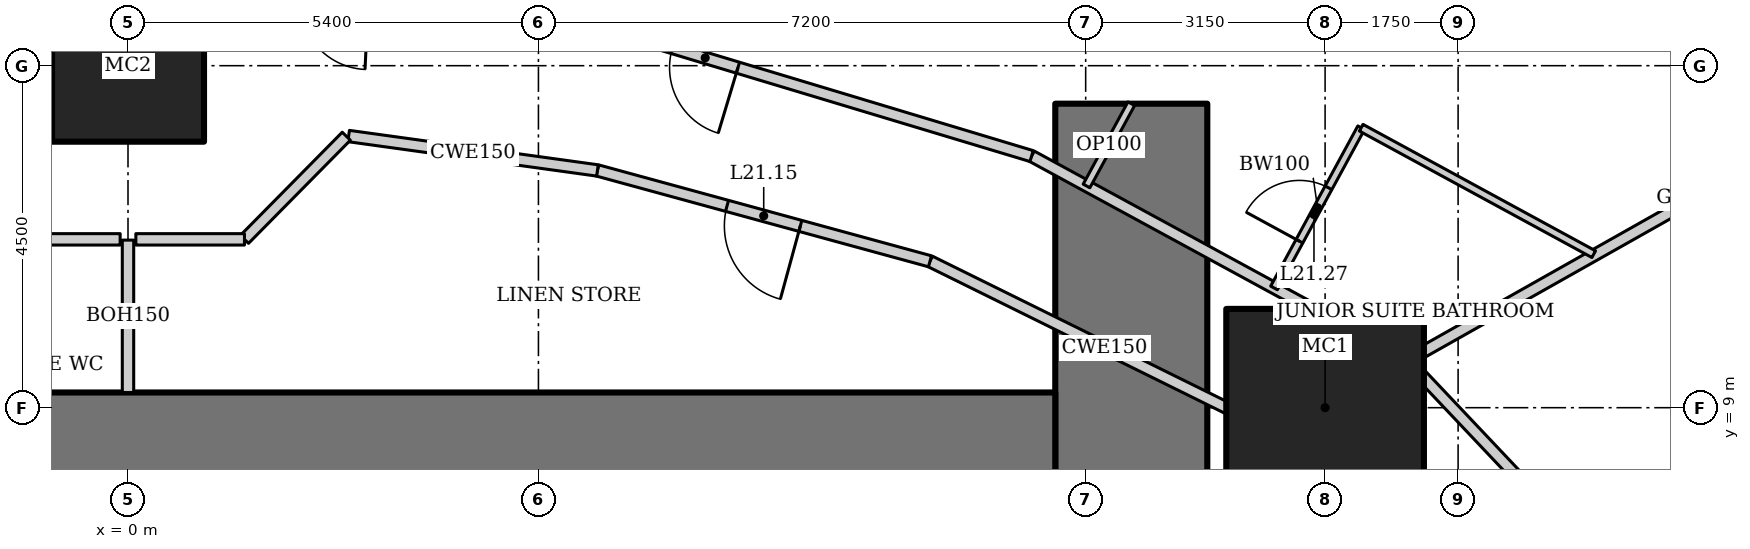
"""IFC4 building model, lengths in metres.
Left out: names, types, materials, properties, quantities, classifications, styles, units other than length and angle.
Written with IfcOpenShell. Run it as: python <this file> out.ifc"""

import sys

from ifc_helpers import new_model, si_unit, direction, frame, frame_2d, origin, origin_2d, place, context, subcontext, project, spatial, rectangle, hollow_rectangle, extrude, element, fill, save


model = new_model("IFC4")
c1 = context("Model", 3, precision=1e-05, world=origin(), true_north=direction((0.0, 1.0)))
c2 = subcontext(c1, "Body", "Model", "MODEL_VIEW")
j1 = project(units=[si_unit("LENGTHUNIT", "METRE"), si_unit("PLANEANGLEUNIT", "RADIAN")], contexts=[c1])
p1 = place(None, origin())
s1 = spatial("IfcSite", under=j1, at=p1, CompositionType="ELEMENT")
p2 = place(p1, origin())
s2 = spatial("IfcBuilding", under=s1, at=p2, CompositionType="ELEMENT")
p3 = place(p2, frame((0.0, 0.0, 91.0)))
s3 = spatial("IfcBuildingStorey", under=s2, at=p3, CompositionType="ELEMENT", Elevation=91.0)
p4 = place(p3, frame((15.75, 9.0, 0.0), z_axis=(0.0, 0.0, 1.0), x_axis=(1.0, 0.0, 0.0)))
e1 = element("IfcColumn", 1, at=p4, inside=s3, PredefinedType="COLUMN", context=c2, shape_type="SweptSolid", body=[
    extrude(hollow_rectangle(XDim=2.6, YDim=2.6, WallThickness=0.13, at=origin_2d()), origin(), (0.0, 0.0, 1.0), 3.6),
])
p5 = place(p3, frame((0.0, 13.5, 0.0), z_axis=(0.0, 0.0, 1.0), x_axis=(1.0, 0.0, 0.0)))
e2 = element("IfcColumn", 2, at=p5, inside=s3, PredefinedType="COLUMN", context=c2, shape_type="SweptSolid", body=[
    extrude(hollow_rectangle(XDim=2.0, YDim=2.0, WallThickness=0.17, at=origin_2d()), origin(), (0.0, 0.0, 1.0), 3.6),
])
p6 = place(p3, frame((13.2, -13.0, 0.0), z_axis=(0.0, 0.0, 1.0), x_axis=(0.0, 1.0, 0.0)))
e3 = element("IfcWall", 3, at=p6, inside=s3, PredefinedType="SHEAR", context=c2, shape_type="SweptSolid", body=[
    extrude(rectangle(XDim=26.0, YDim=2.0, at=frame_2d((13.0, 0.0))), origin(), (0.0, 0.0, 1.0), 3.6),
])
p7 = place(p6, frame((12.1, 0.0, 0.0)))
e4 = element("IfcOpeningElement", 4, at=p7, cuts=e3, PredefinedType="OPENING", context=c2, shape_type="SweptSolid", body=[
    extrude(rectangle(XDim=1.8, YDim=2.1, at=frame_2d((0.9, 1.05))), frame((0.0, 1.01, 0.0), z_axis=(0.0, -1.0, 0.0), x_axis=(1.0, 0.0, 0.0)), (0.0, 0.0, 1.0), 2.02),
])
p8 = place(p3, frame((12.2, 8.0, 0.0), z_axis=(0.0, 0.0, 1.0), x_axis=(-1.0, 0.0, 0.0)))
e5 = element("IfcWall", 5, at=p8, inside=s3, PredefinedType="SHEAR", context=c2, shape_type="SweptSolid", body=[
    extrude(rectangle(XDim=24.4, YDim=2.4, at=frame_2d((12.2, 0.0))), origin(), (0.0, 0.0, 1.0), 3.6),
])
p9 = place(p3, frame((24.435, 13.909, 0.0), z_axis=(0.0, 0.0, 1.0), x_axis=(-0.87090601027, -0.491449612143, 0.0)))
e6 = element("IfcWall", 6, at=p9, inside=s3, PredefinedType="PARTITIONING", context=c2, shape_type="SweptSolid", body=[
    extrude(rectangle(XDim=8.726, YDim=0.15, at=frame_2d((4.363, 0.0))), origin(), (0.0, 0.0, 1.0), 2.693),
])
p10 = place(p3, frame((20.984, 5.232, 0.0), z_axis=(0.0, 0.0, 1.0), x_axis=(-0.687062608696, 0.726598218916, 0.0)))
e7 = element("IfcWall", 7, at=p10, inside=s3, PredefinedType="PARTITIONING", context=c2, shape_type="SweptSolid", body=[
    extrude(rectangle(XDim=6.039, YDim=0.15, at=frame_2d((3.02, 0.0))), origin(), (0.0, 0.0, 1.0), 3.45),
])
p11 = place(p10, frame((0.15, 0.0, 0.0)))
e8 = element("IfcOpeningElement", 8, at=p11, cuts=e7, PredefinedType="OPENING", context=c2, shape_type="SweptSolid", body=[
    extrude(rectangle(XDim=0.9, YDim=2.1, at=frame_2d((0.45, 1.05))), frame((0.0, 0.085, 0.0), z_axis=(0.0, -1.0, 0.0), x_axis=(1.0, 0.0, 0.0)), (0.0, 0.0, 1.0), 0.17),
])
p12 = place(p3, frame((16.835, 9.62, 0.0), z_axis=(0.0, 0.0, 1.0), x_axis=(-0.878450059298, 0.477834169267, 0.0)))
e9 = element("IfcWall", 9, at=p12, inside=s3, PredefinedType="PARTITIONING", context=c2, shape_type="SweptSolid", body=[
    extrude(rectangle(XDim=5.631, YDim=0.15, at=frame_2d((2.815, 0.0))), origin(), (0.0, 0.0, 1.0), 3.45),
])
p13 = place(p3, frame((11.888, 12.311, 0.0), z_axis=(0.0, 0.0, 1.0), x_axis=(-0.957564241242, 0.288219922793, 0.0)))
e10 = element("IfcWall", 10, at=p13, inside=s3, PredefinedType="PARTITIONING", context=c2, shape_type="SweptSolid", body=[
    extrude(rectangle(XDim=5.085, YDim=0.15, at=frame_2d((2.542, 0.0))), origin(), (0.0, 0.0, 1.0), 3.45),
])
p14 = place(p13, frame((4.035, 0.0, 0.0)))
e11 = element("IfcOpeningElement", 11, at=p14, cuts=e10, PredefinedType="OPENING", context=c2, shape_type="SweptSolid", body=[
    extrude(rectangle(XDim=0.9, YDim=2.1, at=frame_2d((0.45, 1.05))), frame((0.0, 0.085, 0.0), z_axis=(0.0, -1.0, 0.0), x_axis=(1.0, 0.0, 0.0)), (0.0, 0.0, 1.0), 0.17),
])
p15 = place(p3, frame((19.177, 4.781, 0.0), z_axis=(0.0, 0.0, 1.0), x_axis=(-0.720837261072, 0.693104352209, 0.0)))
e12 = element("IfcWall", 12, at=p15, inside=s3, PredefinedType="PARTITIONING", context=c2, shape_type="SweptSolid", body=[
    extrude(rectangle(XDim=5.59, YDim=0.15, at=frame_2d((2.795, 0.0))), origin(), (0.0, 0.0, 1.0), 3.45),
])
p16 = place(p15, frame((2.295, 0.0, 0.0)))
e13 = element("IfcOpeningElement", 13, at=p16, cuts=e12, PredefinedType="OPENING", context=c2, shape_type="SweptSolid", body=[
    extrude(rectangle(XDim=1.0, YDim=2.1, at=frame_2d((0.5, 1.05))), frame((0.0, 0.085, 0.0), z_axis=(0.0, -1.0, 0.0), x_axis=(1.0, 0.0, 0.0)), (0.0, 0.0, 1.0), 0.17),
])
p17 = place(p3, frame((15.147, 8.656, 0.0), z_axis=(0.0, 0.0, 1.0), x_axis=(-0.89656943448, 0.442903205177, 0.0)))
e14 = element("IfcWall", 14, at=p17, inside=s3, PredefinedType="PARTITIONING", context=c2, shape_type="SweptSolid", body=[
    extrude(rectangle(XDim=5.126, YDim=0.15, at=frame_2d((2.563, 0.0))), origin(), (0.0, 0.0, 1.0), 3.45),
])
p18 = place(p3, frame((10.551, 10.926, 0.0), z_axis=(0.0, 0.0, 1.0), x_axis=(-0.964644466646, 0.263554648923, 0.0)))
e15 = element("IfcWall", 15, at=p18, inside=s3, PredefinedType="PARTITIONING", context=c2, shape_type="SweptSolid", body=[
    extrude(rectangle(XDim=4.535, YDim=0.15, at=frame_2d((2.268, 0.0))), origin(), (0.0, 0.0, 1.0), 3.45),
])
p19 = place(p18, frame((1.768, 0.0, 0.0)))
e16 = element("IfcOpeningElement", 16, at=p19, cuts=e15, PredefinedType="OPENING", context=c2, shape_type="SweptSolid", body=[
    extrude(rectangle(XDim=1.0, YDim=2.1, at=frame_2d((0.5, 1.05))), frame((0.0, 0.085, 0.0), z_axis=(0.0, -1.0, 0.0), x_axis=(1.0, 0.0, 0.0)), (0.0, 0.0, 1.0), 0.17),
])
p20 = place(p3, frame((6.176, 12.122, 0.0), z_axis=(0.0, 0.0, 1.0), x_axis=(-0.990563451353, 0.137054911782, 0.0)))
e17 = element("IfcWall", 17, at=p20, inside=s3, PredefinedType="PARTITIONING", context=c2, shape_type="SweptSolid", body=[
    extrude(rectangle(XDim=3.304, YDim=0.15, at=frame_2d((1.652, 0.0))), origin(), (0.0, 0.0, 1.0), 3.45),
])
p21 = place(p3, frame((15.078, 10.576, 0.0), z_axis=(0.0, 0.0, 1.0), x_axis=(0.477832549678, 0.878450940274, 0.0)))
e18 = element("IfcWall", 18, at=p21, inside=s3, PredefinedType="PARTITIONING", context=c2, shape_type="SweptSolid", body=[
    extrude(rectangle(XDim=2.4, YDim=0.1, at=frame_2d((1.2, 0.0))), origin(), (0.0, 0.0, 1.0), 3.45),
])
p22 = place(p21, frame((0.7, 0.0, 0.0)))
e19 = element("IfcOpeningElement", 19, at=p22, cuts=e18, PredefinedType="OPENING", context=c2, shape_type="SweptSolid", body=[
    extrude(rectangle(XDim=0.8, YDim=2.1, at=frame_2d((0.4, 1.05))), frame((0.0, 0.06, 0.0), z_axis=(0.0, -1.0, 0.0), x_axis=(1.0, 0.0, 0.0)), (0.0, 0.0, 1.0), 0.12),
])
p23 = place(p3, frame((16.225, 12.684, 0.0), z_axis=(0.0, 0.0, 1.0), x_axis=(0.878473578893, -0.477790928322, 0.0)))
e20 = element("IfcWall", 20, at=p23, inside=s3, PredefinedType="PARTITIONING", context=c2, shape_type="SweptSolid", body=[
    extrude(rectangle(XDim=3.483, YDim=0.1, at=frame_2d((1.741, 0.0))), origin(), (0.0, 0.0, 1.0), 3.45),
])
p24 = place(p3, frame((13.2, 13.0, 0.0), z_axis=(0.0, 0.0, 1.0), x_axis=(-0.477852414256, -0.878440134665, 0.0)))
e21 = element("IfcWall", 21, at=p24, inside=s3, PredefinedType="PARTITIONING", context=c2, shape_type="SweptSolid", body=[
    extrude(rectangle(XDim=1.232, YDim=0.1, at=frame_2d((0.616, 0.0))), origin(), (0.0, 0.0, 1.0), 3.45),
])
p25 = place(p3, frame((0.0, 9.2, 0.0), z_axis=(0.0, 0.0, 1.0), x_axis=(0.0, 1.0, 0.0)))
e22 = element("IfcWall", 22, at=p25, inside=s3, PredefinedType="PARTITIONING", context=c2, shape_type="SweptSolid", body=[
    extrude(rectangle(XDim=2.005, YDim=0.15, at=frame_2d((1.002, 0.0))), origin(), (0.0, 0.0, 1.0), 3.044),
])
p26 = place(p3, frame((2.873, 12.572, 0.0), z_axis=(0.0, 0.0, 1.0), x_axis=(-0.702677261973, -0.711508724828, 0.0)))
e23 = element("IfcWall", 23, at=p26, inside=s3, PredefinedType="PARTITIONING", context=c2, shape_type="SweptSolid", body=[
    extrude(rectangle(XDim=1.907, YDim=0.15, at=frame_2d((0.954, 0.0))), origin(), (0.0, 0.0, 1.0), 3.45),
])
for number, where, z_axis, x_axis in (
    (24, (1.532, 11.215, 0.0), (0.0, 0.0, 1.0), (-1.0, 0.0, 0.0)),
    (25, (-0.103, 11.215, 0.0), (0.0, 0.0, 1.0), (-1.0, 0.0, 0.0)),
):
    element("IfcWall", number, at=place(p3, frame(where, z_axis=z_axis, x_axis=x_axis)), inside=s3, PredefinedType="PARTITIONING", context=c2, shape_type="SweptSolid", body=[
        extrude(rectangle(XDim=1.429, YDim=0.15, at=frame_2d((0.714, 0.0))), origin(), (0.0, 0.0, 1.0), 3.45),
    ])
p27 = place(p19, origin())
e26 = element("IfcDoor", 26, at=p27, inside=s3, OperationType="SINGLE_SWING_LEFT", PredefinedType="DOOR", context=c2, shape_type="SweptSolid", body=[
    extrude(rectangle(XDim=1.0, YDim=2.1, at=frame_2d((0.5, 1.05))), frame((0.0, 0.025, 0.0), z_axis=(0.0, -1.0, 0.0), x_axis=(1.0, 0.0, 0.0)), (0.0, 0.0, 1.0), 0.05),
])
fill(e16, e26)
p28 = place(p22, origin())
e27 = element("IfcDoor", 27, at=p28, inside=s3, OperationType="SINGLE_SWING_LEFT", PredefinedType="DOOR", context=c2, shape_type="SweptSolid", body=[
    extrude(rectangle(XDim=0.8, YDim=2.1, at=frame_2d((0.4, 1.05))), frame((0.0, 0.025, 0.0), z_axis=(0.0, -1.0, 0.0), x_axis=(1.0, 0.0, 0.0)), (0.0, 0.0, 1.0), 0.05),
])
fill(e19, e27)
p29 = place(p14, origin())
e28 = element("IfcDoor", 28, at=p29, inside=s3, OperationType="SINGLE_SWING_LEFT", PredefinedType="DOOR", context=c2, shape_type="SweptSolid", body=[
    extrude(rectangle(XDim=0.9, YDim=2.1, at=frame_2d((0.45, 1.05))), frame((0.0, 0.025, 0.0), z_axis=(0.0, -1.0, 0.0), x_axis=(1.0, 0.0, 0.0)), (0.0, 0.0, 1.0), 0.05),
])
fill(e11, e28)
save(model, sys.argv[1])
